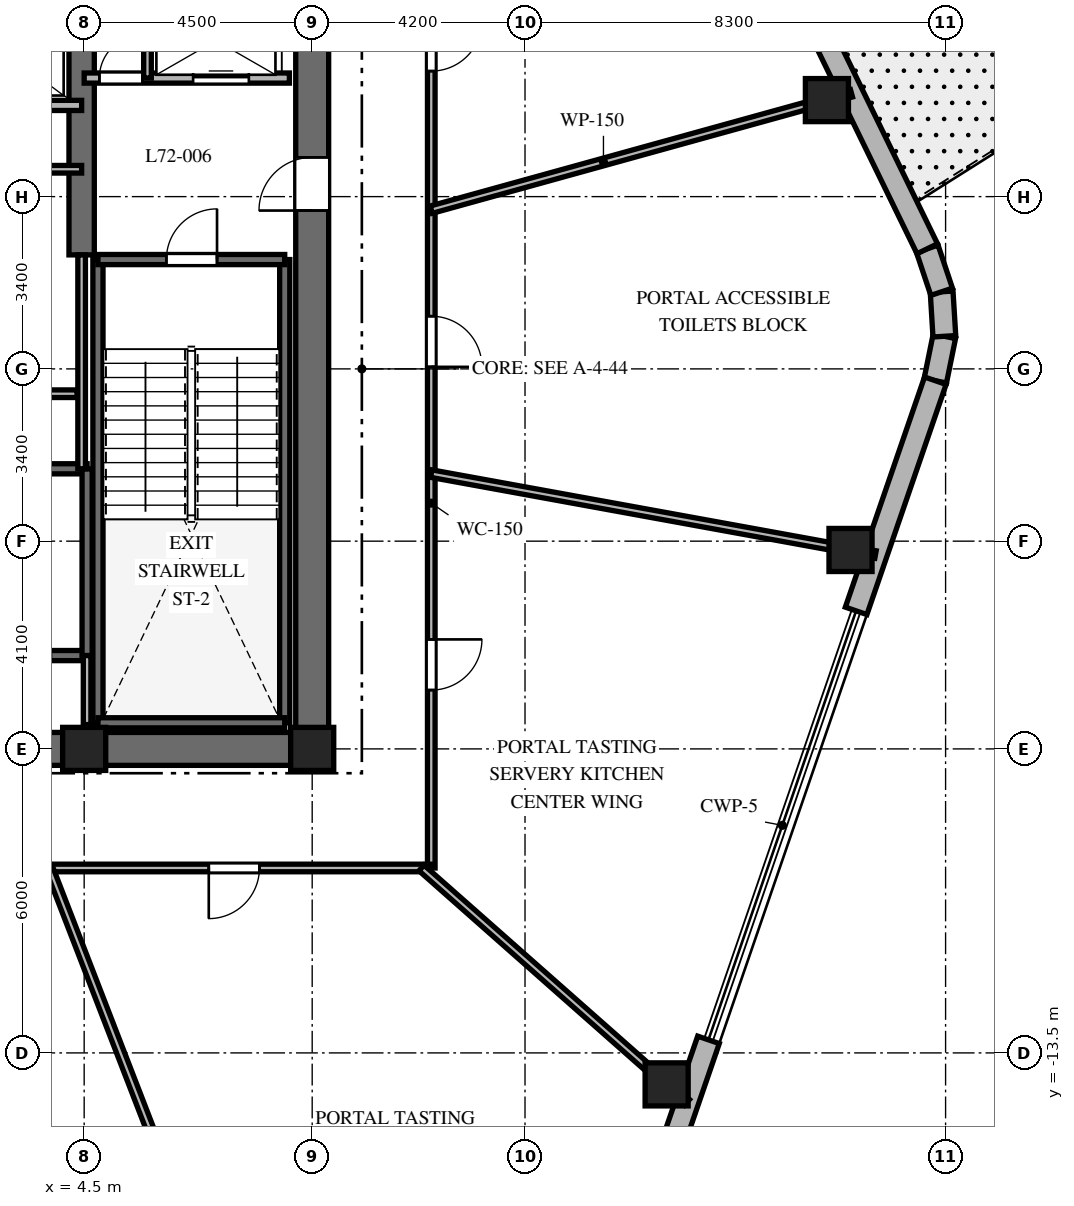
"""IFC4 building model, lengths in metres.
Left out: names, types, materials, properties, quantities, classifications, styles, units other than length and angle.
Written with IfcOpenShell. Run it as: python <this file> out.ifc"""

import sys

from ifc_helpers import new_model, si_unit, direction, frame, frame_2d, origin, origin_2d, place, context, subcontext, project, spatial, rectangle, extrude, element, fill, save


model = new_model("IFC4")
c1 = context("Model", 3, precision=1e-05, world=origin(), true_north=direction((0.0, 1.0)))
c2 = subcontext(c1, "Body", "Model", "MODEL_VIEW")
j1 = project(units=[si_unit("LENGTHUNIT", "METRE"), si_unit("PLANEANGLEUNIT", "RADIAN")], contexts=[c1])
p1 = place(None, origin())
s1 = spatial("IfcSite", under=j1, at=p1, CompositionType="ELEMENT")
p2 = place(p1, origin())
s2 = spatial("IfcBuilding", under=s1, at=p2, CompositionType="ELEMENT")
p3 = place(p2, frame((0.0, 0.0, 288.6)))
s3 = spatial("IfcBuildingStorey", under=s2, at=p3, CompositionType="ELEMENT", Elevation=288.6)
p4 = place(p3, frame((-9.325, -7.5, 0.0), z_axis=(0.0, 0.0, 1.0), x_axis=(1.0, 0.0, 0.0)))
e1 = element("IfcWall", 1, at=p4, inside=s3, PredefinedType="SHEAR", context=c2, shape_type="SweptSolid", body=[
    extrude(rectangle(XDim=18.65, YDim=0.65, at=frame_2d((9.325, 0.0))), origin(), (0.0, 0.0, 1.0), 4.5),
])
p5 = place(p4, frame((9.375, 0.0, 0.0)))
e2 = element("IfcOpeningElement", 2, at=p5, cuts=e1, PredefinedType="OPENING", context=c2, shape_type="SweptSolid", body=[
    extrude(rectangle(XDim=1.0, YDim=2.15, at=frame_2d((0.5, 1.075))), frame((0.0, 0.335, 0.0), z_axis=(0.0, -1.0, 0.0), x_axis=(1.0, 0.0, 0.0)), (0.0, 0.0, 1.0), 0.67),
])
p6 = place(p3, frame((9.0, -7.175, 0.0), z_axis=(0.0, 0.0, 1.0), x_axis=(0.0, 1.0, 0.0)))
e3 = element("IfcWall", 3, at=p6, inside=s3, PredefinedType="SHEAR", context=c2, shape_type="SweptSolid", body=[
    extrude(rectangle(XDim=14.35, YDim=0.65, at=frame_2d((7.175, 0.0))), origin(), (0.0, 0.0, 1.0), 4.5),
])
p7 = place(p6, frame((10.3, 0.0, 0.0)))
e4 = element("IfcOpeningElement", 4, at=p7, cuts=e3, PredefinedType="OPENING", context=c2, shape_type="SweptSolid", body=[
    extrude(rectangle(XDim=1.05, YDim=2.15, at=frame_2d((0.525, 1.075))), frame((0.0, 0.335, 0.0), z_axis=(0.0, -1.0, 0.0), x_axis=(1.0, 0.0, 0.0)), (0.0, 0.0, 1.0), 0.67),
])
p8 = place(p3, frame((4.45, 2.25, 0.0), z_axis=(0.0, 0.0, 1.0), x_axis=(0.0, 1.0, 0.0)))
e5 = element("IfcWall", 5, at=p8, inside=s3, PredefinedType="SHEAR", context=c2, shape_type="SweptSolid", body=[
    extrude(rectangle(XDim=4.925, YDim=0.5, at=frame_2d((2.462, 0.0))), origin(), (0.0, 0.0, 1.0), 4.5),
])
for number, where, z_axis, x_axis in (
    (6, (4.772, -6.985, 0.0), (0.0, 0.0, 1.0), (0.0, 1.0, 0.0)),
    (7, (8.458, -6.985, 0.0), (0.0, 0.0, 1.0), (0.0, 1.0, 0.0)),
):
    element("IfcWall", number, at=place(p3, frame(where, z_axis=z_axis, x_axis=x_axis)), inside=s3, PredefinedType="SHEAR", context=c2, shape_type="SweptSolid", body=[
        extrude(rectangle(XDim=9.143, YDim=0.2, at=frame_2d((4.572, 0.0))), origin(), (0.0, 0.0, 1.0), 4.5),
    ])
p9 = place(p3, frame((4.772, -6.985, 0.0), z_axis=(0.0, 0.0, 1.0), x_axis=(1.0, 0.0, 0.0)))
e8 = element("IfcWall", 8, at=p9, inside=s3, PredefinedType="SHEAR", context=c2, shape_type="SweptSolid", body=[
    extrude(rectangle(XDim=3.686, YDim=0.2, at=frame_2d((1.843, 0.0))), origin(), (0.0, 0.0, 1.0), 4.5),
])
p10 = place(p3, frame((4.772, 2.158, 0.0), z_axis=(0.0, 0.0, 1.0), x_axis=(1.0, 0.0, 0.0)))
e9 = element("IfcWall", 9, at=p10, inside=s3, PredefinedType="SHEAR", context=c2, shape_type="SweptSolid", body=[
    extrude(rectangle(XDim=3.686, YDim=0.2, at=frame_2d((1.843, 0.0))), origin(), (0.0, 0.0, 1.0), 4.5),
])
p11 = place(p10, frame((1.35, 0.0, 0.0)))
e10 = element("IfcOpeningElement", 10, at=p11, cuts=e9, PredefinedType="OPENING", context=c2, shape_type="SweptSolid", body=[
    extrude(rectangle(XDim=1.0, YDim=2.15, at=frame_2d((0.5, 1.075))), frame((0.0, 0.11, 0.0), z_axis=(0.0, -1.0, 0.0), x_axis=(1.0, 0.0, 0.0)), (0.0, 0.0, 1.0), 0.22),
])
p12 = place(p3, frame((-4.608, -5.658, 0.0), z_axis=(0.0, 0.0, 1.0), x_axis=(1.0, 0.0, 0.0)))
e11 = element("IfcWall", 11, at=p12, inside=s3, PredefinedType="SHEAR", context=c2, shape_type="SweptSolid", body=[
    extrude(rectangle(XDim=9.166, YDim=0.2, at=frame_2d((4.583, 0.0))), origin(), (0.0, 0.0, 1.0), 4.5),
])
p13 = place(p12, frame((7.45, 0.0, 0.0)))
e12 = element("IfcOpeningElement", 12, at=p13, cuts=e11, PredefinedType="OPENING", context=c2, shape_type="SweptSolid", body=[
    extrude(rectangle(XDim=1.0, YDim=2.15, at=frame_2d((0.5, 1.075))), frame((0.0, 0.11, 0.0), z_axis=(0.0, -1.0, 0.0), x_axis=(1.0, 0.0, 0.0)), (0.0, 0.0, 1.0), 0.22),
])
p14 = place(p3, frame((-4.608, -1.972, 0.0), z_axis=(0.0, 0.0, 1.0), x_axis=(1.0, 0.0, 0.0)))
e13 = element("IfcWall", 13, at=p14, inside=s3, PredefinedType="SHEAR", context=c2, shape_type="SweptSolid", body=[
    extrude(rectangle(XDim=9.166, YDim=0.2, at=frame_2d((4.583, 0.0))), origin(), (0.0, 0.0, 1.0), 4.5),
])
p15 = place(p3, frame((4.558, -5.658, 0.0), z_axis=(0.0, 0.0, 1.0), x_axis=(0.0, 1.0, 0.0)))
e14 = element("IfcWall", 14, at=p15, inside=s3, PredefinedType="SHEAR", context=c2, shape_type="SweptSolid", body=[
    extrude(rectangle(XDim=3.686, YDim=0.2, at=frame_2d((1.843, 0.0))), origin(), (0.0, 0.0, 1.0), 4.5),
])
for number, where, z_axis, x_axis in (
    (15, (4.5, -7.5, 0.0), (0.0, 0.0, 1.0), (1.0, 0.0, 0.0)),
    (16, (9.0, -7.5, 0.0), (0.0, 0.0, 1.0), (1.0, 0.0, 0.0)),
    (17, (15.995, -14.121, 0.0), (0.0, 0.0, 1.0), (1.0, 0.0, 0.0)),
    (18, (19.624, -3.574, 0.0), (0.0, 0.0, 1.0), (1.0, 0.0, 0.0)),
    (19, (19.158, 5.305, 0.0), (0.0, 0.0, 1.0), (1.0, 0.0, 0.0)),
):
    element("IfcColumn", number, at=place(p3, frame(where, z_axis=z_axis, x_axis=x_axis)), inside=s3, PredefinedType="COLUMN", context=c2, shape_type="SweptSolid", body=[
        extrude(rectangle(XDim=0.85, YDim=0.85, at=origin_2d()), origin(), (0.0, 0.0, 1.0), 4.5),
    ])
p16 = place(p3, frame((21.298, -0.233, 0.0), z_axis=(0.0, 0.0, 1.0), x_axis=(0.199158176661, 0.979967356941, 0.0)))
e20 = element("IfcWall", 20, at=p16, inside=s3, PredefinedType="SOLIDWALL", context=c2, shape_type="SweptSolid", body=[
    extrude(rectangle(XDim=0.895, YDim=0.45, at=frame_2d((0.447, 0.0))), origin(), (0.0, 0.0, 1.0), 4.18),
])
p17 = place(p3, frame((21.476, 0.644, 0.0), z_axis=(0.0, 0.0, 1.0), x_axis=(-0.061031097918, 0.998135865044, 0.0)))
e21 = element("IfcWall", 21, at=p17, inside=s3, PredefinedType="SOLIDWALL", context=c2, shape_type="SweptSolid", body=[
    extrude(rectangle(XDim=0.88, YDim=0.45, at=frame_2d((0.44, 0.0))), origin(), (0.0, 0.0, 1.0), 4.18),
])
p18 = place(p3, frame((21.422, 1.522, 0.0), z_axis=(0.0, 0.0, 1.0), x_axis=(-0.316964162323, 0.94843751497, 0.0)))
e22 = element("IfcWall", 22, at=p18, inside=s3, PredefinedType="SOLIDWALL", context=c2, shape_type="SweptSolid", body=[
    extrude(rectangle(XDim=0.895, YDim=0.45, at=frame_2d((0.448, 0.0))), origin(), (0.0, 0.0, 1.0), 4.18),
])
p19 = place(p3, frame((15.26, -17.776, 0.0), z_axis=(0.0, 0.0, 1.0), x_axis=(0.325408461582, 0.945573547182, 0.0)))
e23 = element("IfcWall", 23, at=p19, inside=s3, PredefinedType="SOLIDWALL", context=c2, shape_type="SweptSolid", body=[
    extrude(rectangle(XDim=4.795, YDim=0.45, at=frame_2d((2.397, 0.0))), origin(), (0.0, 0.0, 1.0), 4.18),
])
p20 = place(p3, frame((19.734, -4.775, 0.0), z_axis=(0.0, 0.0, 1.0), x_axis=(0.325437701015, 0.945563484256, 0.0)))
e24 = element("IfcWall", 24, at=p20, inside=s3, PredefinedType="SOLIDWALL", context=c2, shape_type="SweptSolid", body=[
    extrude(rectangle(XDim=4.803, YDim=0.45, at=frame_2d((2.402, 0.0))), origin(), (0.0, 0.0, 1.0), 4.18),
])
p21 = place(p3, frame((21.138, 2.371, 0.0), z_axis=(0.0, 0.0, 1.0), x_axis=(-0.438135313339, 0.898909031663, 0.0)))
e25 = element("IfcWall", 25, at=p21, inside=s3, PredefinedType="SOLIDWALL", context=c2, shape_type="SweptSolid", body=[
    extrude(rectangle(XDim=4.605, YDim=0.45, at=frame_2d((2.302, 0.0))), origin(), (0.0, 0.0, 1.0), 4.18),
])
p22 = place(p3, frame((4.558, -7.02, 0.0), z_axis=(0.0, 0.0, 1.0), x_axis=(0.0, 1.0, 0.0)))
e26 = element("IfcWall", 26, at=p22, inside=s3, PredefinedType="PARTITIONING", context=c2, shape_type="SweptSolid", body=[
    extrude(rectangle(XDim=1.362, YDim=0.15, at=frame_2d((0.681, 0.0))), origin(), (0.0, 0.0, 1.0), 4.18),
])
p23 = place(p3, frame((4.5, 5.74, 0.0), z_axis=(0.0, 0.0, 1.0), x_axis=(1.0, 0.0, 0.0)))
e27 = element("IfcWall", 27, at=p23, inside=s3, PredefinedType="PARTITIONING", context=c2, shape_type="SweptSolid", body=[
    extrude(rectangle(XDim=4.05, YDim=0.2, at=frame_2d((2.025, 0.0))), origin(), (0.0, 0.0, 1.0), 4.18),
])
p24 = place(p23, frame((0.3, 0.0, 0.0)))
e28 = element("IfcOpeningElement", 28, at=p24, cuts=e27, PredefinedType="OPENING", context=c2, shape_type="SweptSolid", body=[
    extrude(rectangle(XDim=0.85, YDim=2.03, at=frame_2d((0.425, 1.015))), frame((0.0, 0.11, 0.0), z_axis=(0.0, -1.0, 0.0), x_axis=(1.0, 0.0, 0.0)), (0.0, 0.0, 1.0), 0.22),
])
p25 = place(p23, frame((2.15, 0.0, 0.0)))
e29 = element("IfcOpeningElement", 29, at=p25, cuts=e27, PredefinedType="OPENING", context=c2, shape_type="SweptSolid", body=[
    extrude(rectangle(XDim=1.1, YDim=2.2, at=frame_2d((0.55, 1.1))), frame((0.0, 0.11, 0.0), z_axis=(0.0, -1.0, 0.0), x_axis=(1.0, 0.0, 0.0)), (0.0, 0.0, 1.0), 0.22),
])
p26 = place(p3, frame((5.75, 5.74, 0.0), z_axis=(0.0, 0.0, 1.0), x_axis=(0.0, 1.0, 0.0)))
e30 = element("IfcWall", 30, at=p26, inside=s3, PredefinedType="PARTITIONING", context=c2, shape_type="SweptSolid", body=[
    extrude(rectangle(XDim=1.41, YDim=0.15, at=frame_2d((0.705, 0.0))), origin(), (0.0, 0.0, 1.0), 4.18),
])
p27 = place(p3, frame((1.85, 5.2, 0.0), z_axis=(0.0, 0.0, 1.0), x_axis=(1.0, 0.0, 0.0)))
e31 = element("IfcWall", 31, at=p27, inside=s3, PredefinedType="PARTITIONING", context=c2, shape_type="SweptSolid", body=[
    extrude(rectangle(XDim=2.6, YDim=0.2, at=frame_2d((1.3, 0.0))), origin(), (0.0, 0.0, 1.0), 4.18),
])
p28 = place(p27, frame((0.75, 0.0, 0.0)))
e32 = element("IfcOpeningElement", 32, at=p28, cuts=e31, PredefinedType="OPENING", context=c2, shape_type="SweptSolid", body=[
    extrude(rectangle(XDim=1.1, YDim=2.2, at=frame_2d((0.55, 1.1))), frame((0.0, 0.11, 0.0), z_axis=(0.0, -1.0, 0.0), x_axis=(1.0, 0.0, 0.0)), (0.0, 0.0, 1.0), 0.22),
])
p29 = place(p3, frame((4.45, -1.972, 0.0), z_axis=(0.0, 0.0, 1.0), x_axis=(0.0, 1.0, 0.0)))
e33 = element("IfcWall", 33, at=p29, inside=s3, PredefinedType="PARTITIONING", context=c2, shape_type="SweptSolid", body=[
    extrude(rectangle(XDim=4.222, YDim=0.15, at=frame_2d((2.111, 0.0))), origin(), (0.0, 0.0, 1.0), 4.18),
])
p30 = place(p3, frame((1.9, 3.94, 0.0), z_axis=(0.0, 0.0, 1.0), x_axis=(1.0, 0.0, 0.0)))
e34 = element("IfcWall", 34, at=p30, inside=s3, PredefinedType="PARTITIONING", context=c2, shape_type="SweptSolid", body=[
    extrude(rectangle(XDim=2.55, YDim=0.15, at=frame_2d((1.275, 0.0))), origin(), (0.0, 0.0, 1.0), 4.18),
])
p31 = place(p3, frame((-4.36, -0.49, 0.0), z_axis=(0.0, 0.0, 1.0), x_axis=(1.0, 0.0, 0.0)))
e35 = element("IfcWall", 35, at=p31, inside=s3, PredefinedType="PARTITIONING", context=c2, shape_type="SweptSolid", body=[
    extrude(rectangle(XDim=8.72, YDim=0.15, at=frame_2d((4.36, 0.0))), origin(), (0.0, 0.0, 1.0), 4.18),
])
p32 = place(p31, frame((2.81, 0.0, 0.0)))
e36 = element("IfcOpeningElement", 36, at=p32, cuts=e35, PredefinedType="OPENING", context=c2, shape_type="SweptSolid", body=[
    extrude(rectangle(XDim=0.85, YDim=2.03, at=frame_2d((0.425, 1.015))), frame((0.0, 0.085, 0.0), z_axis=(0.0, -1.0, 0.0), x_axis=(1.0, 0.0, 0.0)), (0.0, 0.0, 1.0), 0.17),
])
p33 = place(p31, frame((4.61, 0.0, 0.0)))
e37 = element("IfcOpeningElement", 37, at=p33, cuts=e35, PredefinedType="OPENING", context=c2, shape_type="SweptSolid", body=[
    extrude(rectangle(XDim=0.85, YDim=2.03, at=frame_2d((0.425, 1.015))), frame((0.0, 0.085, 0.0), z_axis=(0.0, -1.0, 0.0), x_axis=(1.0, 0.0, 0.0)), (0.0, 0.0, 1.0), 0.17),
])
p34 = place(p3, frame((11.35, 9.85, 0.0), z_axis=(0.0, 0.0, 1.0), x_axis=(0.0, -1.0, 0.0)))
e38 = element("IfcWall", 38, at=p34, inside=s3, PredefinedType="PARTITIONING", context=c2, shape_type="SweptSolid", body=[
    extrude(rectangle(XDim=19.7, YDim=0.15, at=frame_2d((9.85, 0.0))), origin(), (0.0, 0.0, 1.0), 3.67),
])
p35 = place(p34, frame((2.973, 0.0, 0.0)))
e39 = element("IfcOpeningElement", 39, at=p35, cuts=e38, PredefinedType="OPENING", context=c2, shape_type="SweptSolid", body=[
    extrude(rectangle(XDim=1.0, YDim=2.03, at=frame_2d((0.5, 1.015))), frame((0.0, 0.085, 0.0), z_axis=(0.0, -1.0, 0.0), x_axis=(1.0, 0.0, 0.0)), (0.0, 0.0, 1.0), 0.17),
])
p36 = place(p34, frame((15.189, 0.0, 0.0)))
e40 = element("IfcOpeningElement", 40, at=p36, cuts=e38, PredefinedType="OPENING", context=c2, shape_type="SweptSolid", body=[
    extrude(rectangle(XDim=1.0, YDim=2.03, at=frame_2d((0.5, 1.015))), frame((0.0, 0.085, 0.0), z_axis=(0.0, -1.0, 0.0), x_axis=(1.0, 0.0, 0.0)), (0.0, 0.0, 1.0), 0.17),
])
p37 = place(p34, frame((8.81, 0.0, 0.0)))
e41 = element("IfcOpeningElement", 41, at=p37, cuts=e38, PredefinedType="OPENING", context=c2, shape_type="SweptSolid", body=[
    extrude(rectangle(XDim=1.0, YDim=2.03, at=frame_2d((0.5, 1.015))), frame((0.0, 0.085, 0.0), z_axis=(0.0, -1.0, 0.0), x_axis=(1.0, 0.0, 0.0)), (0.0, 0.0, 1.0), 0.17),
])
p38 = place(p3, frame((11.35, -9.85, 0.0), z_axis=(0.0, 0.0, 1.0), x_axis=(-1.0, 0.0, 0.0)))
e42 = element("IfcWall", 42, at=p38, inside=s3, PredefinedType="PARTITIONING", context=c2, shape_type="SweptSolid", body=[
    extrude(rectangle(XDim=22.7, YDim=0.15, at=frame_2d((11.35, 0.0))), origin(), (0.0, 0.0, 1.0), 3.67),
])
p39 = place(p38, frame((17.22, 0.0, 0.0)))
e43 = element("IfcOpeningElement", 43, at=p39, cuts=e42, PredefinedType="OPENING", context=c2, shape_type="SweptSolid", body=[
    extrude(rectangle(XDim=1.0, YDim=2.03, at=frame_2d((0.5, 1.015))), frame((0.0, 0.085, 0.0), z_axis=(0.0, -1.0, 0.0), x_axis=(1.0, 0.0, 0.0)), (0.0, 0.0, 1.0), 0.17),
])
p40 = place(p38, frame((10.429, 0.0, 0.0)))
e44 = element("IfcOpeningElement", 44, at=p40, cuts=e42, PredefinedType="OPENING", context=c2, shape_type="SweptSolid", body=[
    extrude(rectangle(XDim=1.0, YDim=2.03, at=frame_2d((0.5, 1.015))), frame((0.0, 0.085, 0.0), z_axis=(0.0, -1.0, 0.0), x_axis=(1.0, 0.0, 0.0)), (0.0, 0.0, 1.0), 0.17),
])
p41 = place(p38, frame((3.391, 0.0, 0.0)))
e45 = element("IfcOpeningElement", 45, at=p41, cuts=e42, PredefinedType="OPENING", context=c2, shape_type="SweptSolid", body=[
    extrude(rectangle(XDim=1.0, YDim=2.03, at=frame_2d((0.5, 1.015))), frame((0.0, 0.085, 0.0), z_axis=(0.0, -1.0, 0.0), x_axis=(1.0, 0.0, 0.0)), (0.0, 0.0, 1.0), 0.17),
])
p42 = place(p3, frame((11.35, 3.143, 0.0), z_axis=(0.0, 0.0, 1.0), x_axis=(0.963731818141, 0.266872596386, 0.0)))
e46 = element("IfcWall", 46, at=p42, inside=s3, PredefinedType="PARTITIONING", context=c2, shape_type="SweptSolid", body=[
    extrude(rectangle(XDim=8.605, YDim=0.15, at=frame_2d((4.302, 0.0))), origin(), (0.0, 0.0, 1.0), 3.52),
])
p43 = place(p3, frame((3.808, -9.85, 0.0), z_axis=(0.0, 0.0, 1.0), x_axis=(0.360587327934, -0.932725457427, 0.0)))
e47 = element("IfcWall", 47, at=p43, inside=s3, PredefinedType="PARTITIONING", context=c2, shape_type="SweptSolid", body=[
    extrude(rectangle(XDim=10.962, YDim=0.15, at=frame_2d((5.481, 0.0))), origin(), (0.0, 0.0, 1.0), 3.52),
])
p44 = place(p3, frame((11.157, -9.85, 0.0), z_axis=(0.0, 0.0, 1.0), x_axis=(0.74966962095, -0.661812253909, 0.0)))
e48 = element("IfcWall", 48, at=p44, inside=s3, PredefinedType="PARTITIONING", context=c2, shape_type="SweptSolid", body=[
    extrude(rectangle(XDim=6.989, YDim=0.15, at=frame_2d((3.494, 0.0))), origin(), (0.0, 0.0, 1.0), 3.52),
])
p45 = place(p3, frame((11.35, -2.067, 0.0), z_axis=(0.0, 0.0, 1.0), x_axis=(0.983816386236, -0.179179569634, 0.0)))
e49 = element("IfcWall", 49, at=p45, inside=s3, PredefinedType="PARTITIONING", context=c2, shape_type="SweptSolid", body=[
    extrude(rectangle(XDim=8.911, YDim=0.15, at=frame_2d((4.456, 0.0))), origin(), (0.0, 0.0, 1.0), 3.52),
])
p46 = place(p11, origin())
e50 = element("IfcDoor", 50, at=p46, inside=s3, OperationType="SINGLE_SWING_RIGHT", PredefinedType="DOOR", context=c2, shape_type="SweptSolid", body=[
    extrude(rectangle(XDim=1.0, YDim=2.15, at=frame_2d((0.5, 1.075))), frame((0.0, 0.025, 0.0), z_axis=(0.0, -1.0, 0.0), x_axis=(1.0, 0.0, 0.0)), (0.0, 0.0, 1.0), 0.05),
])
fill(e10, e50)
p47 = place(p7, origin())
e51 = element("IfcDoor", 51, at=p47, inside=s3, OperationType="SINGLE_SWING_LEFT", PredefinedType="DOOR", context=c2, shape_type="SweptSolid", body=[
    extrude(rectangle(XDim=1.05, YDim=2.15, at=frame_2d((0.525, 1.075))), frame((0.0, 0.025, 0.0), z_axis=(0.0, -1.0, 0.0), x_axis=(1.0, 0.0, 0.0)), (0.0, 0.0, 1.0), 0.05),
])
fill(e4, e51)
p48 = place(p24, origin())
e52 = element("IfcDoor", 52, at=p48, inside=s3, OperationType="SINGLE_SWING_RIGHT", PredefinedType="DOOR", context=c2, shape_type="SweptSolid", body=[
    extrude(rectangle(XDim=0.85, YDim=2.03, at=frame_2d((0.425, 1.015))), frame((0.0, 0.025, 0.0), z_axis=(0.0, -1.0, 0.0), x_axis=(1.0, 0.0, 0.0)), (0.0, 0.0, 1.0), 0.05),
])
fill(e28, e52)
p49 = place(p25, origin())
e53 = element("IfcDoor", 53, at=p49, inside=s3, OperationType="SLIDING_TO_RIGHT", PredefinedType="DOOR", context=c2, shape_type="SweptSolid", body=[
    extrude(rectangle(XDim=1.1, YDim=2.2, at=frame_2d((0.55, 1.1))), frame((0.0, 0.025, 0.0), z_axis=(0.0, -1.0, 0.0), x_axis=(1.0, 0.0, 0.0)), (0.0, 0.0, 1.0), 0.05),
])
fill(e29, e53)
p50 = place(p35, origin())
e54 = element("IfcDoor", 54, at=p50, inside=s3, OperationType="SINGLE_SWING_LEFT", PredefinedType="DOOR", context=c2, shape_type="SweptSolid", body=[
    extrude(rectangle(XDim=1.0, YDim=2.03, at=frame_2d((0.5, 1.015))), frame((0.0, 0.025, 0.0), z_axis=(0.0, -1.0, 0.0), x_axis=(1.0, 0.0, 0.0)), (0.0, 0.0, 1.0), 0.05),
])
fill(e39, e54)
p51 = place(p41, origin())
e55 = element("IfcDoor", 55, at=p51, inside=s3, OperationType="SINGLE_SWING_RIGHT", PredefinedType="DOOR", context=c2, shape_type="SweptSolid", body=[
    extrude(rectangle(XDim=1.0, YDim=2.03, at=frame_2d((0.5, 1.015))), frame((0.0, 0.025, 0.0), z_axis=(0.0, -1.0, 0.0), x_axis=(1.0, 0.0, 0.0)), (0.0, 0.0, 1.0), 0.05),
])
fill(e45, e55)
p52 = place(p36, origin())
e56 = element("IfcDoor", 56, at=p52, inside=s3, OperationType="SINGLE_SWING_LEFT", PredefinedType="DOOR", context=c2, shape_type="SweptSolid", body=[
    extrude(rectangle(XDim=1.0, YDim=2.03, at=frame_2d((0.5, 1.015))), frame((0.0, 0.025, 0.0), z_axis=(0.0, -1.0, 0.0), x_axis=(1.0, 0.0, 0.0)), (0.0, 0.0, 1.0), 0.05),
])
fill(e40, e56)
p53 = place(p37, origin())
e57 = element("IfcDoor", 57, at=p53, inside=s3, OperationType="SINGLE_SWING_RIGHT", PredefinedType="DOOR", context=c2, shape_type="SweptSolid", body=[
    extrude(rectangle(XDim=1.0, YDim=2.03, at=frame_2d((0.5, 1.015))), frame((0.0, 0.025, 0.0), z_axis=(0.0, -1.0, 0.0), x_axis=(1.0, 0.0, 0.0)), (0.0, 0.0, 1.0), 0.05),
])
fill(e41, e57)
save(model, sys.argv[1])
